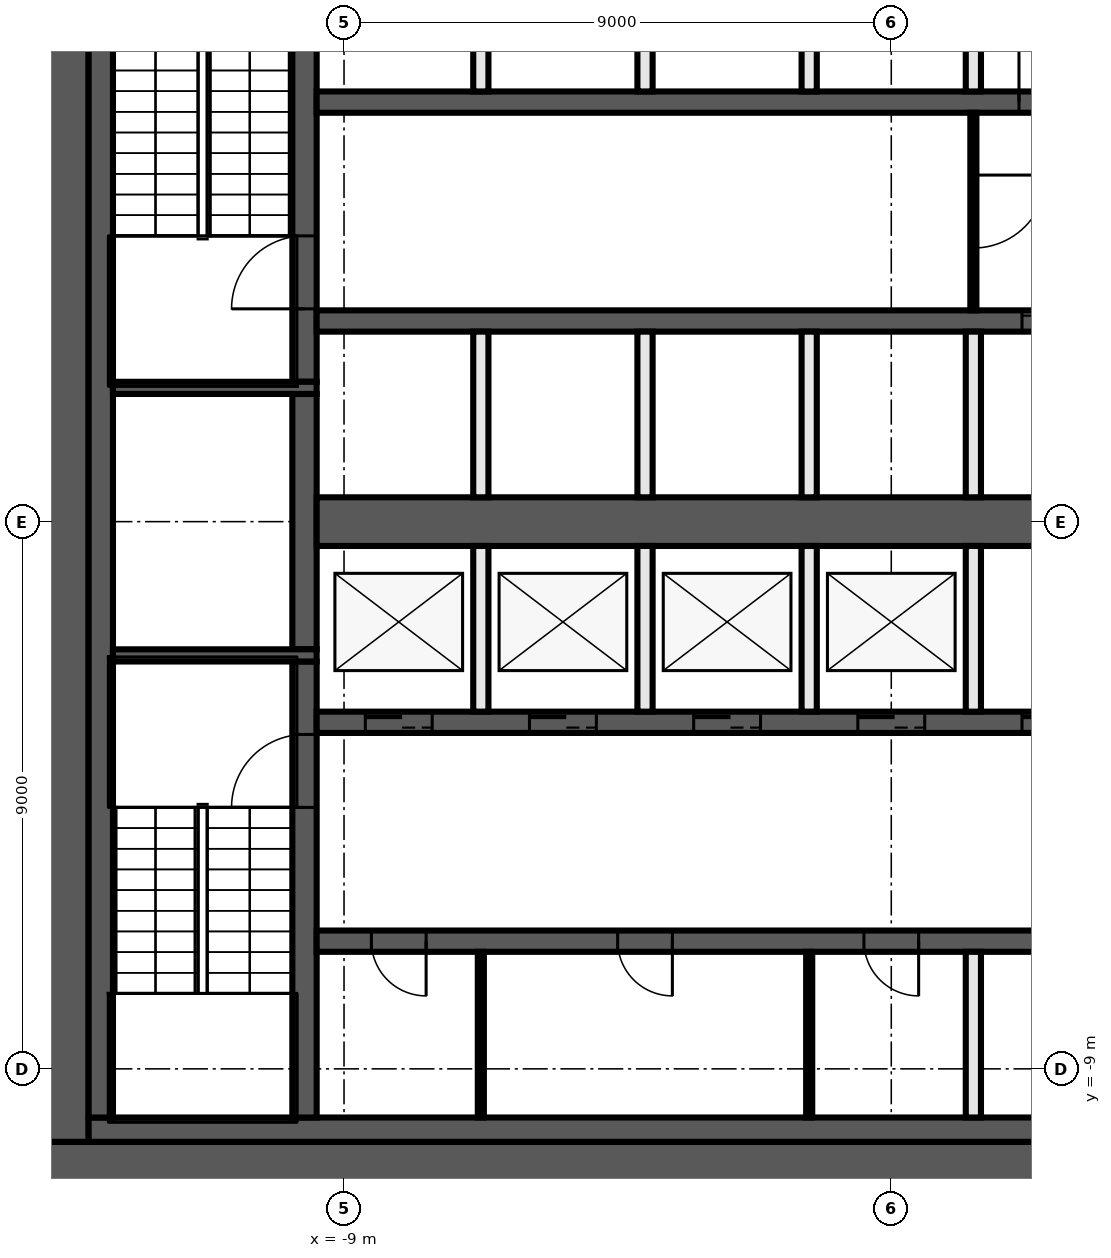
"""IFC4 building model, lengths in metres.
Left out: names, types, materials, properties, quantities, classifications, styles, units other than length and angle.
Written with IfcOpenShell. Run it as: python <this file> out.ifc"""

import sys

from ifc_helpers import new_model, si_unit, direction, frame, frame_2d, origin, place, context, subcontext, project, spatial, rectangle, extrude, element, fill, save


model = new_model("IFC4")
c1 = context("Model", 3, precision=1e-05, world=origin(), true_north=direction((0.0, 1.0)))
c2 = subcontext(c1, "Body", "Model", "MODEL_VIEW")
j1 = project(units=[si_unit("LENGTHUNIT", "METRE"), si_unit("PLANEANGLEUNIT", "RADIAN")], contexts=[c1])
p1 = place(None, origin())
s1 = spatial("IfcSite", under=j1, at=p1, CompositionType="ELEMENT")
p2 = place(p1, origin())
s2 = spatial("IfcBuilding", under=s1, at=p2, CompositionType="ELEMENT")
p3 = place(p2, frame((0.0, 0.0, 151.6)))
s3 = spatial("IfcBuildingStorey", under=s2, at=p3, CompositionType="ELEMENT", Elevation=151.6)
p4 = place(p3, frame((14.0, -10.6, 0.0), z_axis=(0.0, 0.0, 1.0), x_axis=(-1.0, 0.0, 0.0)))
e1 = element("IfcWall", 1, at=p4, inside=s3, PredefinedType="SHEAR", context=c2, shape_type="SweptSolid", body=[
    extrude(rectangle(XDim=28.0, YDim=0.8, at=frame_2d((14.0, 0.0))), origin(), (0.0, 0.0, 1.0), 6.62),
])
p5 = place(p4, frame((5.1, 0.0, 0.0)))
e2 = element("IfcOpeningElement", 2, at=p5, cuts=e1, PredefinedType="OPENING", context=c2, shape_type="SweptSolid", body=[
    extrude(rectangle(XDim=1.6, YDim=2.1, at=frame_2d((0.8, 1.05))), frame((0.0, 0.41, 0.0), z_axis=(0.0, -1.0, 0.0), x_axis=(1.0, 0.0, 0.0)), (0.0, 0.0, 1.0), 0.82),
])
p6 = place(p3, frame((-13.6, -10.2, 0.0), z_axis=(0.0, 0.0, 1.0), x_axis=(0.0, 1.0, 0.0)))
e3 = element("IfcWall", 3, at=p6, inside=s3, PredefinedType="SHEAR", context=c2, shape_type="SweptSolid", body=[
    extrude(rectangle(XDim=20.4, YDim=0.8, at=frame_2d((10.2, 0.0))), origin(), (0.0, 0.0, 1.0), 6.62),
])
p7 = place(p3, frame((6.9, -10.0, 0.0), z_axis=(0.0, 0.0, 1.0), x_axis=(-1.0, 0.0, 0.0)))
e4 = element("IfcWall", 4, at=p7, inside=s3, PredefinedType="SHEAR", context=c2, shape_type="SweptSolid", body=[
    extrude(rectangle(XDim=20.1, YDim=0.4, at=frame_2d((10.05, 0.0))), origin(), (0.0, 0.0, 1.0), 6.62),
])
p8 = place(p3, frame((-13.0, -9.8, 0.0), z_axis=(0.0, 0.0, 1.0), x_axis=(0.0, 1.0, 0.0)))
e5 = element("IfcWall", 5, at=p8, inside=s3, PredefinedType="SHEAR", context=c2, shape_type="SweptSolid", body=[
    extrude(rectangle(XDim=19.6, YDim=0.4, at=frame_2d((9.8, 0.0))), origin(), (0.0, 0.0, 1.0), 6.62),
])
p9 = place(p3, frame((-9.65, -9.8, 0.0), z_axis=(0.0, 0.0, 1.0), x_axis=(0.0, 1.0, 0.0)))
e6 = element("IfcWall", 6, at=p9, inside=s3, PredefinedType="SHEAR", context=c2, shape_type="SweptSolid", body=[
    extrude(rectangle(XDim=7.5, YDim=0.4, at=frame_2d((3.75, 0.0))), origin(), (0.0, 0.0, 1.0), 6.62),
])
p10 = place(p9, frame((5.1, 0.0, 0.0)))
e7 = element("IfcOpeningElement", 7, at=p10, cuts=e6, PredefinedType="OPENING", context=c2, shape_type="SweptSolid", body=[
    extrude(rectangle(XDim=1.2, YDim=2.1, at=frame_2d((0.6, 1.05))), frame((0.0, 0.21, 0.0), z_axis=(0.0, -1.0, 0.0), x_axis=(1.0, 0.0, 0.0)), (0.0, 0.0, 1.0), 0.42),
])
p11 = place(p3, frame((-9.65, -2.1, 0.0), z_axis=(0.0, 0.0, 1.0), x_axis=(0.0, 1.0, 0.0)))
e8 = element("IfcWall", 8, at=p11, inside=s3, PredefinedType="SHEAR", context=c2, shape_type="SweptSolid", body=[
    extrude(rectangle(XDim=4.2, YDim=0.4, at=frame_2d((2.1, 0.0))), origin(), (0.0, 0.0, 1.0), 6.62),
])
p12 = place(p3, frame((-9.65, 2.3, 0.0), z_axis=(0.0, 0.0, 1.0), x_axis=(0.0, 1.0, 0.0)))
e9 = element("IfcWall", 9, at=p12, inside=s3, PredefinedType="SHEAR", context=c2, shape_type="SweptSolid", body=[
    extrude(rectangle(XDim=7.5, YDim=0.4, at=frame_2d((3.75, 0.0))), origin(), (0.0, 0.0, 1.0), 6.62),
])
p13 = place(p12, frame((1.2, 0.0, 0.0)))
e10 = element("IfcOpeningElement", 10, at=p13, cuts=e9, PredefinedType="OPENING", context=c2, shape_type="SweptSolid", body=[
    extrude(rectangle(XDim=1.2, YDim=2.1, at=frame_2d((0.6, 1.05))), frame((0.0, 0.21, 0.0), z_axis=(0.0, -1.0, 0.0), x_axis=(1.0, 0.0, 0.0)), (0.0, 0.0, 1.0), 0.42),
])
for number, where, z_axis, x_axis in (
    (11, (-9.45, 2.2, 0.0), (0.0, 0.0, 1.0), (-1.0, 0.0, 0.0)),
    (12, (-9.45, -2.2, 0.0), (0.0, 0.0, 1.0), (-1.0, 0.0, 0.0)),
):
    element("IfcWall", number, at=place(p3, frame(where, z_axis=z_axis, x_axis=x_axis)), inside=s3, PredefinedType="SHEAR", context=c2, shape_type="SweptSolid", body=[
        extrude(rectangle(XDim=3.35, YDim=0.2, at=frame_2d((1.675, 0.0))), origin(), (0.0, 0.0, 1.0), 6.62),
    ])
p14 = place(p3, frame((-9.45, 6.9, 0.0), z_axis=(0.0, 0.0, 1.0), x_axis=(1.0, 0.0, 0.0)))
e13 = element("IfcWall", 13, at=p14, inside=s3, PredefinedType="SHEAR", context=c2, shape_type="SweptSolid", body=[
    extrude(rectangle(XDim=18.9, YDim=0.35, at=frame_2d((9.45, 0.0))), origin(), (0.0, 0.0, 1.0), 6.62),
])
p15 = place(p14, frame((11.55, 0.0, 0.0)))
e14 = element("IfcOpeningElement", 14, at=p15, cuts=e13, PredefinedType="OPENING", context=c2, shape_type="SweptSolid", body=[
    extrude(rectangle(XDim=1.2, YDim=2.1, at=frame_2d((0.6, 1.05))), frame((0.0, 0.185, 0.0), z_axis=(0.0, -1.0, 0.0), x_axis=(1.0, 0.0, 0.0)), (0.0, 0.0, 1.0), 0.37),
])
p16 = place(p14, frame((14.3, 0.0, 0.0)))
e15 = element("IfcOpeningElement", 15, at=p16, cuts=e13, PredefinedType="OPENING", context=c2, shape_type="SweptSolid", body=[
    extrude(rectangle(XDim=1.1, YDim=2.1, at=frame_2d((0.55, 1.05))), frame((0.0, 0.185, 0.0), z_axis=(0.0, -1.0, 0.0), x_axis=(1.0, 0.0, 0.0)), (0.0, 0.0, 1.0), 0.37),
])
p17 = place(p14, frame((17.0, 0.0, 0.0)))
e16 = element("IfcOpeningElement", 16, at=p17, cuts=e13, PredefinedType="OPENING", context=c2, shape_type="SweptSolid", body=[
    extrude(rectangle(XDim=1.1, YDim=2.1, at=frame_2d((0.55, 1.05))), frame((0.0, 0.185, 0.0), z_axis=(0.0, -1.0, 0.0), x_axis=(1.0, 0.0, 0.0)), (0.0, 0.0, 1.0), 0.37),
])
p18 = place(p3, frame((9.45, 3.3, 0.0), z_axis=(0.0, 0.0, 1.0), x_axis=(-1.0, 0.0, 0.0)))
e17 = element("IfcWall", 17, at=p18, inside=s3, PredefinedType="SHEAR", context=c2, shape_type="SweptSolid", body=[
    extrude(rectangle(XDim=18.9, YDim=0.35, at=frame_2d((9.45, 0.0))), origin(), (0.0, 0.0, 1.0), 6.62),
])
p19 = place(p18, frame((6.2, 0.0, 0.0)))
e18 = element("IfcOpeningElement", 18, at=p19, cuts=e17, PredefinedType="OPENING", context=c2, shape_type="SweptSolid", body=[
    extrude(rectangle(XDim=1.1, YDim=2.1, at=frame_2d((0.55, 1.05))), frame((0.0, 0.185, 0.0), z_axis=(0.0, -1.0, 0.0), x_axis=(1.0, 0.0, 0.0)), (0.0, 0.0, 1.0), 0.37),
])
p20 = place(p18, frame((3.5, 0.0, 0.0)))
e19 = element("IfcOpeningElement", 19, at=p20, cuts=e17, PredefinedType="OPENING", context=c2, shape_type="SweptSolid", body=[
    extrude(rectangle(XDim=1.1, YDim=2.1, at=frame_2d((0.55, 1.05))), frame((0.0, 0.185, 0.0), z_axis=(0.0, -1.0, 0.0), x_axis=(1.0, 0.0, 0.0)), (0.0, 0.0, 1.0), 0.37),
])
p21 = place(p18, frame((0.9, 0.0, 0.0)))
e20 = element("IfcOpeningElement", 20, at=p21, cuts=e17, PredefinedType="OPENING", context=c2, shape_type="SweptSolid", body=[
    extrude(rectangle(XDim=0.9, YDim=2.1, at=frame_2d((0.45, 1.05))), frame((0.0, 0.185, 0.0), z_axis=(0.0, -1.0, 0.0), x_axis=(1.0, 0.0, 0.0)), (0.0, 0.0, 1.0), 0.37),
])
p22 = place(p3, frame((-9.45, -3.3, 0.0), z_axis=(0.0, 0.0, 1.0), x_axis=(1.0, 0.0, 0.0)))
e21 = element("IfcWall", 21, at=p22, inside=s3, PredefinedType="SHEAR", context=c2, shape_type="SweptSolid", body=[
    extrude(rectangle(XDim=18.9, YDim=0.35, at=frame_2d((9.45, 0.0))), origin(), (0.0, 0.0, 1.0), 6.62),
])
p23 = place(p22, frame((0.8, 0.0, 0.0)))
e22 = element("IfcOpeningElement", 22, at=p23, cuts=e21, PredefinedType="OPENING", context=c2, shape_type="SweptSolid", body=[
    extrude(rectangle(XDim=1.1, YDim=2.1, at=frame_2d((0.55, 1.05))), frame((0.0, 0.185, 0.0), z_axis=(0.0, -1.0, 0.0), x_axis=(1.0, 0.0, 0.0)), (0.0, 0.0, 1.0), 0.37),
])
p24 = place(p22, frame((3.5, 0.0, 0.0)))
e23 = element("IfcOpeningElement", 23, at=p24, cuts=e21, PredefinedType="OPENING", context=c2, shape_type="SweptSolid", body=[
    extrude(rectangle(XDim=1.1, YDim=2.1, at=frame_2d((0.55, 1.05))), frame((0.0, 0.185, 0.0), z_axis=(0.0, -1.0, 0.0), x_axis=(1.0, 0.0, 0.0)), (0.0, 0.0, 1.0), 0.37),
])
p25 = place(p22, frame((6.2, 0.0, 0.0)))
e24 = element("IfcOpeningElement", 24, at=p25, cuts=e21, PredefinedType="OPENING", context=c2, shape_type="SweptSolid", body=[
    extrude(rectangle(XDim=1.1, YDim=2.1, at=frame_2d((0.55, 1.05))), frame((0.0, 0.185, 0.0), z_axis=(0.0, -1.0, 0.0), x_axis=(1.0, 0.0, 0.0)), (0.0, 0.0, 1.0), 0.37),
])
p26 = place(p22, frame((8.9, 0.0, 0.0)))
e25 = element("IfcOpeningElement", 25, at=p26, cuts=e21, PredefinedType="OPENING", context=c2, shape_type="SweptSolid", body=[
    extrude(rectangle(XDim=1.1, YDim=2.1, at=frame_2d((0.55, 1.05))), frame((0.0, 0.185, 0.0), z_axis=(0.0, -1.0, 0.0), x_axis=(1.0, 0.0, 0.0)), (0.0, 0.0, 1.0), 0.37),
])
p27 = place(p22, frame((11.6, 0.0, 0.0)))
e26 = element("IfcOpeningElement", 26, at=p27, cuts=e21, PredefinedType="OPENING", context=c2, shape_type="SweptSolid", body=[
    extrude(rectangle(XDim=1.1, YDim=2.1, at=frame_2d((0.55, 1.05))), frame((0.0, 0.185, 0.0), z_axis=(0.0, -1.0, 0.0), x_axis=(1.0, 0.0, 0.0)), (0.0, 0.0, 1.0), 0.37),
])
p28 = place(p22, frame((14.3, 0.0, 0.0)))
e27 = element("IfcOpeningElement", 27, at=p28, cuts=e21, PredefinedType="OPENING", context=c2, shape_type="SweptSolid", body=[
    extrude(rectangle(XDim=1.1, YDim=2.1, at=frame_2d((0.55, 1.05))), frame((0.0, 0.185, 0.0), z_axis=(0.0, -1.0, 0.0), x_axis=(1.0, 0.0, 0.0)), (0.0, 0.0, 1.0), 0.37),
])
p29 = place(p22, frame((17.0, 0.0, 0.0)))
e28 = element("IfcOpeningElement", 28, at=p29, cuts=e21, PredefinedType="OPENING", context=c2, shape_type="SweptSolid", body=[
    extrude(rectangle(XDim=1.1, YDim=2.1, at=frame_2d((0.55, 1.05))), frame((0.0, 0.185, 0.0), z_axis=(0.0, -1.0, 0.0), x_axis=(1.0, 0.0, 0.0)), (0.0, 0.0, 1.0), 0.37),
])
p30 = place(p3, frame((9.45, -6.9, 0.0), z_axis=(0.0, 0.0, 1.0), x_axis=(-1.0, 0.0, 0.0)))
e29 = element("IfcWall", 29, at=p30, inside=s3, PredefinedType="SHEAR", context=c2, shape_type="SweptSolid", body=[
    extrude(rectangle(XDim=18.9, YDim=0.35, at=frame_2d((9.45, 0.0))), origin(), (0.0, 0.0, 1.0), 6.62),
])
p31 = place(p30, frame((0.75, 0.0, 0.0)))
e30 = element("IfcOpeningElement", 30, at=p31, cuts=e29, PredefinedType="OPENING", context=c2, shape_type="SweptSolid", body=[
    extrude(rectangle(XDim=1.2, YDim=2.1, at=frame_2d((0.6, 1.05))), frame((0.0, 0.185, 0.0), z_axis=(0.0, -1.0, 0.0), x_axis=(1.0, 0.0, 0.0)), (0.0, 0.0, 1.0), 0.37),
])
p32 = place(p30, frame((17.1, 0.0, 0.0)))
e31 = element("IfcOpeningElement", 31, at=p32, cuts=e29, PredefinedType="OPENING", context=c2, shape_type="SweptSolid", body=[
    extrude(rectangle(XDim=0.9, YDim=2.1, at=frame_2d((0.45, 1.05))), frame((0.0, 0.185, 0.0), z_axis=(0.0, -1.0, 0.0), x_axis=(1.0, 0.0, 0.0)), (0.0, 0.0, 1.0), 0.37),
])
p33 = place(p30, frame((13.05, 0.0, 0.0)))
e32 = element("IfcOpeningElement", 32, at=p33, cuts=e29, PredefinedType="OPENING", context=c2, shape_type="SweptSolid", body=[
    extrude(rectangle(XDim=0.9, YDim=2.1, at=frame_2d((0.45, 1.05))), frame((0.0, 0.185, 0.0), z_axis=(0.0, -1.0, 0.0), x_axis=(1.0, 0.0, 0.0)), (0.0, 0.0, 1.0), 0.37),
])
p34 = place(p30, frame((9.0, 0.0, 0.0)))
e33 = element("IfcOpeningElement", 33, at=p34, cuts=e29, PredefinedType="OPENING", context=c2, shape_type="SweptSolid", body=[
    extrude(rectangle(XDim=0.9, YDim=2.1, at=frame_2d((0.45, 1.05))), frame((0.0, 0.185, 0.0), z_axis=(0.0, -1.0, 0.0), x_axis=(1.0, 0.0, 0.0)), (0.0, 0.0, 1.0), 0.37),
])
p35 = place(p3, frame((-9.45, 0.0, 0.0), z_axis=(0.0, 0.0, 1.0), x_axis=(1.0, 0.0, 0.0)))
e34 = element("IfcWall", 34, at=p35, inside=s3, PredefinedType="SHEAR", context=c2, shape_type="SweptSolid", body=[
    extrude(rectangle(XDim=18.9, YDim=0.8, at=frame_2d((9.45, 0.0))), origin(), (0.0, 0.0, 1.0), 6.62),
])
p36 = place(p3, frame((1.35, 6.725, 0.0), z_axis=(0.0, 0.0, 1.0), x_axis=(0.0, -1.0, 0.0)))
e35 = element("IfcWall", 35, at=p36, inside=s3, PredefinedType="PARTITIONING", context=c2, shape_type="SweptSolid", body=[
    extrude(rectangle(XDim=3.25, YDim=0.1, at=frame_2d((1.625, 0.0))), origin(), (0.0, 0.0, 1.0), 6.62),
])
p37 = place(p36, frame((1.025, 0.0, 0.0)))
e36 = element("IfcOpeningElement", 36, at=p37, cuts=e35, PredefinedType="OPENING", context=c2, shape_type="SweptSolid", body=[
    extrude(rectangle(XDim=1.2, YDim=2.1, at=frame_2d((0.6, 1.05))), frame((0.0, 0.06, 0.0), z_axis=(0.0, -1.0, 0.0), x_axis=(1.0, 0.0, 0.0)), (0.0, 0.0, 1.0), 0.12),
])
for number, where, z_axis, x_axis in (
    (37, (1.35, -9.8, 0.0), (0.0, 0.0, 1.0), (0.0, 1.0, 0.0)),
    (38, (1.35, -3.125, 0.0), (0.0, 0.0, 1.0), (0.0, 1.0, 0.0)),
    (39, (1.35, 0.4, 0.0), (0.0, 0.0, 1.0), (0.0, 1.0, 0.0)),
    (40, (1.35, 7.075, 0.0), (0.0, 0.0, 1.0), (0.0, 1.0, 0.0)),
):
    element("IfcWall", number, at=place(p3, frame(where, z_axis=z_axis, x_axis=x_axis)), inside=s3, PredefinedType="SOLIDWALL", context=c2, shape_type="SweptSolid", body=[
        extrude(rectangle(XDim=2.725, YDim=0.25, at=frame_2d((1.363, 0.0))), origin(), (0.0, 0.0, 1.0), 6.62),
    ])
p38 = place(p3, frame((-1.35, -9.8, 0.0), z_axis=(0.0, 0.0, 1.0), x_axis=(0.0, 1.0, 0.0)))
e41 = element("IfcWall", 41, at=p38, inside=s3, PredefinedType="PARTITIONING", context=c2, shape_type="SweptSolid", body=[
    extrude(rectangle(XDim=2.725, YDim=0.1, at=frame_2d((1.363, 0.0))), origin(), (0.0, 0.0, 1.0), 6.62),
])
for number, where, z_axis, x_axis in (
    (42, (-1.35, -3.125, 0.0), (0.0, 0.0, 1.0), (0.0, 1.0, 0.0)),
    (43, (-1.35, 0.4, 0.0), (0.0, 0.0, 1.0), (0.0, 1.0, 0.0)),
    (44, (-1.35, 7.075, 0.0), (0.0, 0.0, 1.0), (0.0, 1.0, 0.0)),
    (45, (-4.05, -3.125, 0.0), (0.0, 0.0, 1.0), (0.0, 1.0, 0.0)),
    (46, (-4.05, 0.4, 0.0), (0.0, 0.0, 1.0), (0.0, 1.0, 0.0)),
    (47, (-4.05, 7.075, 0.0), (0.0, 0.0, 1.0), (0.0, 1.0, 0.0)),
):
    element("IfcWall", number, at=place(p3, frame(where, z_axis=z_axis, x_axis=x_axis)), inside=s3, PredefinedType="SOLIDWALL", context=c2, shape_type="SweptSolid", body=[
        extrude(rectangle(XDim=2.725, YDim=0.25, at=frame_2d((1.363, 0.0))), origin(), (0.0, 0.0, 1.0), 6.62),
    ])
p39 = place(p3, frame((-6.75, -9.8, 0.0), z_axis=(0.0, 0.0, 1.0), x_axis=(0.0, 1.0, 0.0)))
e48 = element("IfcWall", 48, at=p39, inside=s3, PredefinedType="PARTITIONING", context=c2, shape_type="SweptSolid", body=[
    extrude(rectangle(XDim=2.725, YDim=0.1, at=frame_2d((1.363, 0.0))), origin(), (0.0, 0.0, 1.0), 6.62),
])
for number, where, z_axis, x_axis in (
    (49, (-6.75, -3.125, 0.0), (0.0, 0.0, 1.0), (0.0, 1.0, 0.0)),
    (50, (-6.75, 0.4, 0.0), (0.0, 0.0, 1.0), (0.0, 1.0, 0.0)),
    (51, (-6.75, 7.075, 0.0), (0.0, 0.0, 1.0), (0.0, 1.0, 0.0)),
):
    element("IfcWall", number, at=place(p3, frame(where, z_axis=z_axis, x_axis=x_axis)), inside=s3, PredefinedType="SOLIDWALL", context=c2, shape_type="SweptSolid", body=[
        extrude(rectangle(XDim=2.725, YDim=0.25, at=frame_2d((1.363, 0.0))), origin(), (0.0, 0.0, 1.0), 6.62),
    ])
p40 = place(p15, origin())
e52 = element("IfcDoor", 52, at=p40, inside=s3, OperationType="SINGLE_SWING_LEFT", PredefinedType="DOOR", context=c2, shape_type="SweptSolid", body=[
    extrude(rectangle(XDim=1.2, YDim=2.1, at=frame_2d((0.6, 1.05))), frame((0.0, 0.025, 0.0), z_axis=(0.0, -1.0, 0.0), x_axis=(1.0, 0.0, 0.0)), (0.0, 0.0, 1.0), 0.05),
])
fill(e14, e52)
p41 = place(p19, origin())
e53 = element("IfcDoor", 53, at=p41, inside=s3, OperationType="DOUBLE_DOOR_SLIDING", PredefinedType="DOOR", context=c2, shape_type="SweptSolid", body=[
    extrude(rectangle(XDim=1.1, YDim=2.1, at=frame_2d((0.55, 1.05))), frame((0.0, 0.025, 0.0), z_axis=(0.0, -1.0, 0.0), x_axis=(1.0, 0.0, 0.0)), (0.0, 0.0, 1.0), 0.05),
])
fill(e18, e53)
p42 = place(p23, origin())
e54 = element("IfcDoor", 54, at=p42, inside=s3, OperationType="DOUBLE_DOOR_SLIDING", PredefinedType="DOOR", context=c2, shape_type="SweptSolid", body=[
    extrude(rectangle(XDim=1.1, YDim=2.1, at=frame_2d((0.55, 1.05))), frame((0.0, 0.025, 0.0), z_axis=(0.0, -1.0, 0.0), x_axis=(1.0, 0.0, 0.0)), (0.0, 0.0, 1.0), 0.05),
])
fill(e22, e54)
p43 = place(p24, origin())
e55 = element("IfcDoor", 55, at=p43, inside=s3, OperationType="DOUBLE_DOOR_SLIDING", PredefinedType="DOOR", context=c2, shape_type="SweptSolid", body=[
    extrude(rectangle(XDim=1.1, YDim=2.1, at=frame_2d((0.55, 1.05))), frame((0.0, 0.025, 0.0), z_axis=(0.0, -1.0, 0.0), x_axis=(1.0, 0.0, 0.0)), (0.0, 0.0, 1.0), 0.05),
])
fill(e23, e55)
p44 = place(p25, origin())
e56 = element("IfcDoor", 56, at=p44, inside=s3, OperationType="DOUBLE_DOOR_SLIDING", PredefinedType="DOOR", context=c2, shape_type="SweptSolid", body=[
    extrude(rectangle(XDim=1.1, YDim=2.1, at=frame_2d((0.55, 1.05))), frame((0.0, 0.025, 0.0), z_axis=(0.0, -1.0, 0.0), x_axis=(1.0, 0.0, 0.0)), (0.0, 0.0, 1.0), 0.05),
])
fill(e24, e56)
p45 = place(p26, origin())
e57 = element("IfcDoor", 57, at=p45, inside=s3, OperationType="DOUBLE_DOOR_SLIDING", PredefinedType="DOOR", context=c2, shape_type="SweptSolid", body=[
    extrude(rectangle(XDim=1.1, YDim=2.1, at=frame_2d((0.55, 1.05))), frame((0.0, 0.025, 0.0), z_axis=(0.0, -1.0, 0.0), x_axis=(1.0, 0.0, 0.0)), (0.0, 0.0, 1.0), 0.05),
])
fill(e25, e57)
p46 = place(p27, origin())
e58 = element("IfcDoor", 58, at=p46, inside=s3, OperationType="DOUBLE_DOOR_SLIDING", PredefinedType="DOOR", context=c2, shape_type="SweptSolid", body=[
    extrude(rectangle(XDim=1.1, YDim=2.1, at=frame_2d((0.55, 1.05))), frame((0.0, 0.025, 0.0), z_axis=(0.0, -1.0, 0.0), x_axis=(1.0, 0.0, 0.0)), (0.0, 0.0, 1.0), 0.05),
])
fill(e26, e58)
p47 = place(p32, origin())
e59 = element("IfcDoor", 59, at=p47, inside=s3, OperationType="SINGLE_SWING_RIGHT", PredefinedType="DOOR", context=c2, shape_type="SweptSolid", body=[
    extrude(rectangle(XDim=0.9, YDim=2.1, at=frame_2d((0.45, 1.05))), frame((0.0, 0.025, 0.0), z_axis=(0.0, -1.0, 0.0), x_axis=(1.0, 0.0, 0.0)), (0.0, 0.0, 1.0), 0.05),
])
fill(e31, e59)
p48 = place(p33, origin())
e60 = element("IfcDoor", 60, at=p48, inside=s3, OperationType="SINGLE_SWING_LEFT", PredefinedType="DOOR", context=c2, shape_type="SweptSolid", body=[
    extrude(rectangle(XDim=0.9, YDim=2.1, at=frame_2d((0.45, 1.05))), frame((0.0, 0.025, 0.0), z_axis=(0.0, -1.0, 0.0), x_axis=(1.0, 0.0, 0.0)), (0.0, 0.0, 1.0), 0.05),
])
fill(e32, e60)
p49 = place(p34, origin())
e61 = element("IfcDoor", 61, at=p49, inside=s3, OperationType="SINGLE_SWING_RIGHT", PredefinedType="DOOR", context=c2, shape_type="SweptSolid", body=[
    extrude(rectangle(XDim=0.9, YDim=2.1, at=frame_2d((0.45, 1.05))), frame((0.0, 0.025, 0.0), z_axis=(0.0, -1.0, 0.0), x_axis=(1.0, 0.0, 0.0)), (0.0, 0.0, 1.0), 0.05),
])
fill(e33, e61)
p50 = place(p13, origin())
e62 = element("IfcDoor", 62, at=p50, inside=s3, OperationType="SINGLE_SWING_RIGHT", PredefinedType="DOOR", context=c2, shape_type="SweptSolid", body=[
    extrude(rectangle(XDim=1.2, YDim=2.1, at=frame_2d((0.6, 1.05))), frame((0.0, 0.025, 0.0), z_axis=(0.0, -1.0, 0.0), x_axis=(1.0, 0.0, 0.0)), (0.0, 0.0, 1.0), 0.05),
])
fill(e10, e62)
p51 = place(p10, origin())
e63 = element("IfcDoor", 63, at=p51, inside=s3, OperationType="SINGLE_SWING_LEFT", PredefinedType="DOOR", context=c2, shape_type="SweptSolid", body=[
    extrude(rectangle(XDim=1.2, YDim=2.1, at=frame_2d((0.6, 1.05))), frame((0.0, 0.025, 0.0), z_axis=(0.0, -1.0, 0.0), x_axis=(1.0, 0.0, 0.0)), (0.0, 0.0, 1.0), 0.05),
])
fill(e7, e63)
p52 = place(p37, origin())
e64 = element("IfcDoor", 64, at=p52, inside=s3, OperationType="SINGLE_SWING_LEFT", PredefinedType="DOOR", context=c2, shape_type="SweptSolid", body=[
    extrude(rectangle(XDim=1.2, YDim=2.1, at=frame_2d((0.6, 1.05))), frame((0.0, 0.025, 0.0), z_axis=(0.0, -1.0, 0.0), x_axis=(1.0, 0.0, 0.0)), (0.0, 0.0, 1.0), 0.05),
])
fill(e36, e64)
save(model, sys.argv[1])
